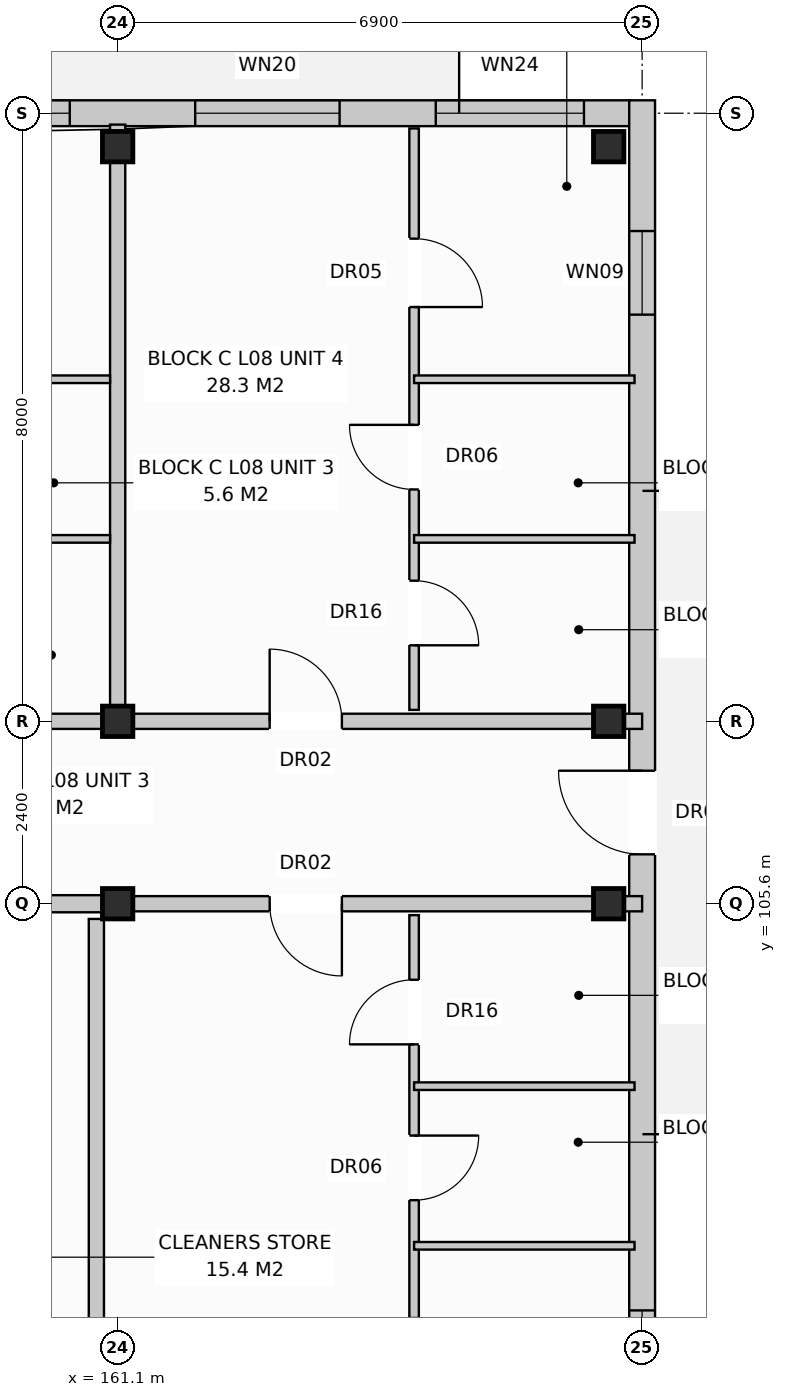
"""IFC4 building model, lengths in metres.
Left out: names, types, materials, properties, quantities, classifications, styles, units other than length and angle.
Written with IfcOpenShell. Run it as: python <this file> out.ifc"""

import sys

from ifc_helpers import new_model, si_unit, direction, frame, frame_2d, origin, origin_with_axes, origin_2d, place, context, subcontext, project, spatial, rectangle, extrude, element, fill, save


model = new_model("IFC4")
c1 = context("Model", 3, precision=1e-05, world=origin(), true_north=direction((0.0, 1.0)))
c2 = subcontext(c1, "Body", "Model", "MODEL_VIEW")
j1 = project(units=[si_unit("LENGTHUNIT", "METRE"), si_unit("PLANEANGLEUNIT", "RADIAN")], contexts=[c1])
p1 = place(None, origin())
s1 = spatial("IfcSite", under=j1, at=p1, CompositionType="ELEMENT")
p2 = place(p1, origin())
s2 = spatial("IfcBuilding", under=s1, at=p2, CompositionType="ELEMENT")
p3 = place(p2, frame((0.0, 0.0, 27.2)))
s3 = spatial("IfcBuildingStorey", under=s2, at=p3, CompositionType="ELEMENT", Elevation=27.2)
for number, where, z_axis, x_axis in (
    (1, (161.1, 105.6, 0.0), (0.0, 0.0, 1.0), (1.0, 0.0, 0.0)),
    (2, (161.1, 108.0, 0.0), (0.0, 0.0, 1.0), (1.0, 0.0, 0.0)),
    (3, (161.1, 115.56, 0.0), (0.0, 0.0, 1.0), (1.0, 0.0, 0.0)),
    (4, (167.56, 105.6, 0.0), (0.0, 0.0, 1.0), (1.0, 0.0, 0.0)),
    (5, (167.56, 108.0, 0.0), (0.0, 0.0, 1.0), (1.0, 0.0, 0.0)),
    (6, (167.56, 115.56, 0.0), (0.0, 0.0, 1.0), (1.0, 0.0, 0.0)),
):
    element("IfcColumn", number, at=place(p3, frame(where, z_axis=z_axis, x_axis=x_axis)), inside=s3, PredefinedType="COLUMN", context=c2, shape_type="SweptSolid", body=[
        extrude(rectangle(XDim=0.4, YDim=0.4, at=origin_2d()), origin(), (0.0, 0.0, 1.0), 3.2),
    ])
p4 = place(p3, frame((126.76, 116.0, 0.0), z_axis=(0.0, 0.0, 1.0), x_axis=(1.0, 0.0, 0.0)))
e7 = element("IfcWall", 7, at=p4, inside=s3, PredefinedType="STANDARD", context=c2, shape_type="SweptSolid", body=[
    extrude(rectangle(XDim=41.08, YDim=0.34, at=frame_2d((20.54, 0.0))), origin(), (0.0, 0.0, 1.0), 2.96),
])
p5 = place(p4, frame((2.767, 0.0, 0.0)))
e8 = element("IfcOpeningElement", 8, at=p5, cuts=e7, PredefinedType="OPENING", context=c2, shape_type="SweptSolid", body=[
    extrude(rectangle(XDim=1.05, YDim=2.12, at=frame_2d((0.525, 1.06))), frame((0.0, 0.182, 0.0), z_axis=(0.0, -1.0, 0.0), x_axis=(1.0, 0.0, 0.0)), (0.0, 0.0, 1.0), 0.364),
])
p6 = place(p4, frame((17.567, 0.0, 0.0)))
e9 = element("IfcOpeningElement", 9, at=p6, cuts=e7, PredefinedType="OPENING", context=c2, shape_type="SweptSolid", body=[
    extrude(rectangle(XDim=1.05, YDim=2.12, at=frame_2d((0.525, 1.06))), frame((0.0, 0.182, 0.0), z_axis=(0.0, -1.0, 0.0), x_axis=(1.0, 0.0, 0.0)), (0.0, 0.0, 1.0), 0.364),
])
p7 = place(p4, frame((30.067, 0.0, 0.0)))
e10 = element("IfcOpeningElement", 10, at=p7, cuts=e7, PredefinedType="OPENING", context=c2, shape_type="SweptSolid", body=[
    extrude(rectangle(XDim=1.05, YDim=2.12, at=frame_2d((0.525, 1.06))), frame((0.0, 0.182, 0.0), z_axis=(0.0, -1.0, 0.0), x_axis=(1.0, 0.0, 0.0)), (0.0, 0.0, 1.0), 0.364),
])
p8 = place(p4, frame((0.642, 0.0, 0.8)))
e11 = element("IfcOpeningElement", 11, at=p8, cuts=e7, PredefinedType="OPENING", context=c2, shape_type="SweptSolid", body=[
    extrude(rectangle(XDim=1.9, YDim=1.85, at=frame_2d((0.95, 0.925))), frame((0.0, 0.182, 0.0), z_axis=(0.0, -1.0, 0.0), x_axis=(1.0, 0.0, 0.0)), (0.0, 0.0, 1.0), 0.364),
])
p9 = place(p4, frame((4.41, 0.0, 0.8)))
e12 = element("IfcOpeningElement", 12, at=p9, cuts=e7, PredefinedType="OPENING", context=c2, shape_type="SweptSolid", body=[
    extrude(rectangle(XDim=1.8, YDim=1.7, at=frame_2d((0.9, 0.85))), frame((0.0, 0.182, 0.0), z_axis=(0.0, -1.0, 0.0), x_axis=(1.0, 0.0, 0.0)), (0.0, 0.0, 1.0), 0.364),
])
p10 = place(p4, frame((10.46, 0.0, 0.72)))
e13 = element("IfcOpeningElement", 13, at=p10, cuts=e7, PredefinedType="OPENING", context=c2, shape_type="SweptSolid", body=[
    extrude(rectangle(XDim=1.1, YDim=1.5, at=frame_2d((0.55, 0.75))), frame((0.0, 0.182, 0.0), z_axis=(0.0, -1.0, 0.0), x_axis=(1.0, 0.0, 0.0)), (0.0, 0.0, 1.0), 0.364),
])
p11 = place(p4, frame((15.76, 0.0, 0.72)))
e14 = element("IfcOpeningElement", 14, at=p11, cuts=e7, PredefinedType="OPENING", context=c2, shape_type="SweptSolid", body=[
    extrude(rectangle(XDim=1.1, YDim=1.5, at=frame_2d((0.55, 0.75))), frame((0.0, 0.182, 0.0), z_axis=(0.0, -1.0, 0.0), x_axis=(1.0, 0.0, 0.0)), (0.0, 0.0, 1.0), 0.364),
])
p12 = place(p4, frame((21.11, 0.0, 0.8)))
e15 = element("IfcOpeningElement", 15, at=p12, cuts=e7, PredefinedType="OPENING", context=c2, shape_type="SweptSolid", body=[
    extrude(rectangle(XDim=1.8, YDim=1.7, at=frame_2d((0.9, 0.85))), frame((0.0, 0.182, 0.0), z_axis=(0.0, -1.0, 0.0), x_axis=(1.0, 0.0, 0.0)), (0.0, 0.0, 1.0), 0.364),
])
p13 = place(p4, frame((24.66, 0.0, 0.72)))
e16 = element("IfcOpeningElement", 16, at=p13, cuts=e7, PredefinedType="OPENING", context=c2, shape_type="SweptSolid", body=[
    extrude(rectangle(XDim=1.1, YDim=1.5, at=frame_2d((0.55, 0.75))), frame((0.0, 0.182, 0.0), z_axis=(0.0, -1.0, 0.0), x_axis=(1.0, 0.0, 0.0)), (0.0, 0.0, 1.0), 0.364),
])
p14 = place(p4, frame((27.892, 0.0, 0.8)))
e17 = element("IfcOpeningElement", 17, at=p14, cuts=e7, PredefinedType="OPENING", context=c2, shape_type="SweptSolid", body=[
    extrude(rectangle(XDim=1.95, YDim=1.65, at=frame_2d((0.975, 0.825))), frame((0.0, 0.182, 0.0), z_axis=(0.0, -1.0, 0.0), x_axis=(1.0, 0.0, 0.0)), (0.0, 0.0, 1.0), 0.364),
])
p15 = place(p4, frame((31.91, 0.0, 0.8)))
e18 = element("IfcOpeningElement", 18, at=p15, cuts=e7, PredefinedType="OPENING", context=c2, shape_type="SweptSolid", body=[
    extrude(rectangle(XDim=1.8, YDim=1.7, at=frame_2d((0.9, 0.85))), frame((0.0, 0.182, 0.0), z_axis=(0.0, -1.0, 0.0), x_axis=(1.0, 0.0, 0.0)), (0.0, 0.0, 1.0), 0.364),
])
p16 = place(p4, frame((35.36, 0.0, 0.72)))
e19 = element("IfcOpeningElement", 19, at=p16, cuts=e7, PredefinedType="OPENING", context=c2, shape_type="SweptSolid", body=[
    extrude(rectangle(XDim=1.9, YDim=1.85, at=frame_2d((0.95, 0.925))), frame((0.0, 0.182, 0.0), z_axis=(0.0, -1.0, 0.0), x_axis=(1.0, 0.0, 0.0)), (0.0, 0.0, 1.0), 0.364),
])
p17 = place(p4, frame((38.525, 0.0, 0.8)))
e20 = element("IfcOpeningElement", 20, at=p17, cuts=e7, PredefinedType="OPENING", context=c2, shape_type="SweptSolid", body=[
    extrude(rectangle(XDim=1.95, YDim=1.65, at=frame_2d((0.975, 0.825))), frame((0.0, 0.182, 0.0), z_axis=(0.0, -1.0, 0.0), x_axis=(1.0, 0.0, 0.0)), (0.0, 0.0, 1.0), 0.364),
])
p18 = place(p3, frame((168.0, 97.43, 0.0), z_axis=(0.0, 0.0, 1.0), x_axis=(0.0, 1.0, 0.0)))
e21 = element("IfcWall", 21, at=p18, inside=s3, PredefinedType="STANDARD", context=c2, shape_type="SweptSolid", body=[
    extrude(rectangle(XDim=18.74, YDim=0.34, at=frame_2d((9.37, 0.0))), origin(), (0.0, 0.0, 1.0), 2.96),
])
p19 = place(p18, frame((8.82, 0.0, 0.0)))
e22 = element("IfcOpeningElement", 22, at=p19, cuts=e21, PredefinedType="OPENING", context=c2, shape_type="SweptSolid", body=[
    extrude(rectangle(XDim=1.1, YDim=2.1, at=frame_2d((0.55, 1.05))), frame((0.0, 0.182, 0.0), z_axis=(0.0, -1.0, 0.0), x_axis=(1.0, 0.0, 0.0)), (0.0, 0.0, 1.0), 0.364),
])
p20 = place(p18, frame((1.72, 0.0, 0.72)))
e23 = element("IfcOpeningElement", 23, at=p20, cuts=e21, PredefinedType="OPENING", context=c2, shape_type="SweptSolid", body=[
    extrude(rectangle(XDim=1.1, YDim=1.5, at=frame_2d((0.55, 0.75))), frame((0.0, 0.182, 0.0), z_axis=(0.0, -1.0, 0.0), x_axis=(1.0, 0.0, 0.0)), (0.0, 0.0, 1.0), 0.364),
])
p21 = place(p18, frame((15.92, 0.0, 0.72)))
e24 = element("IfcOpeningElement", 24, at=p21, cuts=e21, PredefinedType="OPENING", context=c2, shape_type="SweptSolid", body=[
    extrude(rectangle(XDim=1.1, YDim=1.5, at=frame_2d((0.55, 0.75))), frame((0.0, 0.182, 0.0), z_axis=(0.0, -1.0, 0.0), x_axis=(1.0, 0.0, 0.0)), (0.0, 0.0, 1.0), 0.364),
])
p22 = place(p3, frame((160.82, 97.8, 0.0), z_axis=(0.0, 0.0, 1.0), x_axis=(0.0, 1.0, 0.0)))
e25 = element("IfcWall", 25, at=p22, inside=s3, PredefinedType="PARTITIONING", context=c2, shape_type="SweptSolid", body=[
    extrude(rectangle(XDim=7.6, YDim=0.2, at=frame_2d((3.8, 0.0))), origin(), (0.0, 0.0, 1.0), 2.4),
])
p23 = place(p3, frame((151.2, 105.6, 0.0), z_axis=(0.0, 0.0, 1.0), x_axis=(1.0, 0.0, 0.0)))
e26 = element("IfcWall", 26, at=p23, inside=s3, PredefinedType="PARTITIONING", context=c2, shape_type="SweptSolid", body=[
    extrude(rectangle(XDim=9.9, YDim=0.225, at=frame_2d((4.95, 0.0))), origin(), (0.0, 0.0, 1.0), 2.4),
])
p24 = place(p23, frame((0.475, 0.0, 0.0)))
e27 = element("IfcOpeningElement", 27, at=p24, cuts=e26, PredefinedType="OPENING", context=c2, shape_type="SweptSolid", body=[
    extrude(rectangle(XDim=1.1, YDim=2.15, at=frame_2d((0.55, 1.075))), frame((0.0, 0.125, 0.0), z_axis=(0.0, -1.0, 0.0), x_axis=(1.0, 0.0, 0.0)), (0.0, 0.0, 1.0), 0.249),
])
p25 = place(p23, frame((5.75, 0.0, 0.0)))
e28 = element("IfcOpeningElement", 28, at=p25, cuts=e26, PredefinedType="OPENING", context=c2, shape_type="SweptSolid", body=[
    extrude(rectangle(XDim=0.9, YDim=2.1, at=frame_2d((0.45, 1.05))), frame((0.0, 0.125, 0.0), z_axis=(0.0, -1.0, 0.0), x_axis=(1.0, 0.0, 0.0)), (0.0, 0.0, 1.0), 0.249),
])
p26 = place(p23, frame((7.8, 0.0, 0.0)))
e29 = element("IfcOpeningElement", 29, at=p26, cuts=e26, PredefinedType="OPENING", context=c2, shape_type="SweptSolid", body=[
    extrude(rectangle(XDim=0.95, YDim=2.15, at=frame_2d((0.475, 1.075))), frame((0.0, 0.125, 0.0), z_axis=(0.0, -1.0, 0.0), x_axis=(1.0, 0.0, 0.0)), (0.0, 0.0, 1.0), 0.249),
])
p27 = place(p3, frame((161.1, 108.15, 0.0), z_axis=(0.0, 0.0, 1.0), x_axis=(0.0, 1.0, 0.0)))
e30 = element("IfcWall", 30, at=p27, inside=s3, PredefinedType="PARTITIONING", context=c2, shape_type="SweptSolid", body=[
    extrude(rectangle(XDim=7.7, YDim=0.2, at=frame_2d((3.85, 0.0))), origin(), (0.0, 0.0, 1.0), 2.4),
])
p28 = place(p3, frame((154.2, 108.0, 0.0), z_axis=(0.0, 0.0, 1.0), x_axis=(1.0, 0.0, 0.0)))
e31 = element("IfcWall", 31, at=p28, inside=s3, PredefinedType="PARTITIONING", context=c2, shape_type="SweptSolid", body=[
    extrude(rectangle(XDim=6.9, YDim=0.2, at=frame_2d((3.45, 0.0))), origin(), (0.0, 0.0, 1.0), 2.4),
])
p29 = place(p28, frame((2.0, 0.0, 0.0)))
e32 = element("IfcOpeningElement", 32, at=p29, cuts=e31, PredefinedType="OPENING", context=c2, shape_type="SweptSolid", body=[
    extrude(rectangle(XDim=0.95, YDim=2.15, at=frame_2d((0.475, 1.075))), frame((0.0, 0.112, 0.0), z_axis=(0.0, -1.0, 0.0), x_axis=(1.0, 0.0, 0.0)), (0.0, 0.0, 1.0), 0.224),
])
for number, where, z_axis, x_axis in (
    (33, (158.1, 110.4, 0.0), (0.0, 0.0, 1.0), (1.0, 0.0, 0.0)),
    (34, (158.1, 112.5, 0.0), (0.0, 0.0, 1.0), (1.0, 0.0, 0.0)),
):
    element("IfcWall", number, at=place(p3, frame(where, z_axis=z_axis, x_axis=x_axis)), inside=s3, PredefinedType="PARTITIONING", context=c2, shape_type="SweptSolid", body=[
        extrude(rectangle(XDim=2.9, YDim=0.1, at=frame_2d((1.45, 0.0))), origin(), (0.0, 0.0, 1.0), 2.96),
    ])
p30 = place(p3, frame((161.1, 108.0, 0.0), z_axis=(0.0, 0.0, 1.0), x_axis=(1.0, 0.0, 0.0)))
e35 = element("IfcWall", 35, at=p30, inside=s3, PredefinedType="PARTITIONING", context=c2, shape_type="SweptSolid", body=[
    extrude(rectangle(XDim=6.9, YDim=0.2, at=frame_2d((3.45, 0.0))), origin(), (0.0, 0.0, 1.0), 2.4),
])
p31 = place(p30, frame((2.0, 0.0, 0.0)))
e36 = element("IfcOpeningElement", 36, at=p31, cuts=e35, PredefinedType="OPENING", context=c2, shape_type="SweptSolid", body=[
    extrude(rectangle(XDim=0.95, YDim=2.15, at=frame_2d((0.475, 1.075))), frame((0.0, 0.112, 0.0), z_axis=(0.0, -1.0, 0.0), x_axis=(1.0, 0.0, 0.0)), (0.0, 0.0, 1.0), 0.224),
])
p32 = place(p3, frame((165.0, 108.15, 0.0), z_axis=(0.0, 0.0, 1.0), x_axis=(0.0, 1.0, 0.0)))
e37 = element("IfcWall", 37, at=p32, inside=s3, PredefinedType="PARTITIONING", context=c2, shape_type="SweptSolid", body=[
    extrude(rectangle(XDim=7.65, YDim=0.125, at=frame_2d((3.825, 0.0))), origin(), (0.0, 0.0, 1.0), 2.59),
])
p33 = place(p32, frame((0.85, 0.0, 0.0)))
e38 = element("IfcOpeningElement", 38, at=p33, cuts=e37, PredefinedType="OPENING", context=c2, shape_type="SweptSolid", body=[
    extrude(rectangle(XDim=0.85, YDim=2.1, at=frame_2d((0.425, 1.05))), frame((0.0, 0.074, 0.0), z_axis=(0.0, -1.0, 0.0), x_axis=(1.0, 0.0, 0.0)), (0.0, 0.0, 1.0), 0.149),
])
p34 = place(p32, frame((2.9, 0.0, 0.0)))
e39 = element("IfcOpeningElement", 39, at=p34, cuts=e37, PredefinedType="OPENING", context=c2, shape_type="SweptSolid", body=[
    extrude(rectangle(XDim=0.85, YDim=2.05, at=frame_2d((0.425, 1.025))), frame((0.0, 0.074, 0.0), z_axis=(0.0, -1.0, 0.0), x_axis=(1.0, 0.0, 0.0)), (0.0, 0.0, 1.0), 0.149),
])
p35 = place(p32, frame((5.3, 0.0, 0.0)))
e40 = element("IfcOpeningElement", 40, at=p35, cuts=e37, PredefinedType="OPENING", context=c2, shape_type="SweptSolid", body=[
    extrude(rectangle(XDim=0.9, YDim=2.1, at=frame_2d((0.45, 1.05))), frame((0.0, 0.074, 0.0), z_axis=(0.0, -1.0, 0.0), x_axis=(1.0, 0.0, 0.0)), (0.0, 0.0, 1.0), 0.149),
])
for number, where, z_axis, x_axis in (
    (41, (165.0, 110.4, 0.0), (0.0, 0.0, 1.0), (1.0, 0.0, 0.0)),
    (42, (165.0, 112.5, 0.0), (0.0, 0.0, 1.0), (1.0, 0.0, 0.0)),
):
    element("IfcWall", number, at=place(p3, frame(where, z_axis=z_axis, x_axis=x_axis)), inside=s3, PredefinedType="PARTITIONING", context=c2, shape_type="SweptSolid", body=[
        extrude(rectangle(XDim=2.9, YDim=0.1, at=frame_2d((1.45, 0.0))), origin(), (0.0, 0.0, 1.0), 2.96),
    ])
p36 = place(p3, frame((161.1, 105.6, 0.0), z_axis=(0.0, 0.0, 1.0), x_axis=(1.0, 0.0, 0.0)))
e43 = element("IfcWall", 43, at=p36, inside=s3, PredefinedType="PARTITIONING", context=c2, shape_type="SweptSolid", body=[
    extrude(rectangle(XDim=6.9, YDim=0.2, at=frame_2d((3.45, 0.0))), origin(), (0.0, 0.0, 1.0), 2.4),
])
p37 = place(p36, frame((2.0, 0.0, 0.0)))
e44 = element("IfcOpeningElement", 44, at=p37, cuts=e43, PredefinedType="OPENING", context=c2, shape_type="SweptSolid", body=[
    extrude(rectangle(XDim=0.95, YDim=2.15, at=frame_2d((0.475, 1.075))), frame((0.0, 0.112, 0.0), z_axis=(0.0, -1.0, 0.0), x_axis=(1.0, 0.0, 0.0)), (0.0, 0.0, 1.0), 0.224),
])
p38 = place(p3, frame((165.0, 105.45, 0.0), z_axis=(0.0, 0.0, 1.0), x_axis=(0.0, -1.0, 0.0)))
e45 = element("IfcWall", 45, at=p38, inside=s3, PredefinedType="PARTITIONING", context=c2, shape_type="SweptSolid", body=[
    extrude(rectangle(XDim=7.65, YDim=0.125, at=frame_2d((3.825, 0.0))), origin(), (0.0, 0.0, 1.0), 2.59),
])
p39 = place(p38, frame((0.85, 0.0, 0.0)))
e46 = element("IfcOpeningElement", 46, at=p39, cuts=e45, PredefinedType="OPENING", context=c2, shape_type="SweptSolid", body=[
    extrude(rectangle(XDim=0.85, YDim=2.1, at=frame_2d((0.425, 1.05))), frame((0.0, 0.074, 0.0), z_axis=(0.0, -1.0, 0.0), x_axis=(1.0, 0.0, 0.0)), (0.0, 0.0, 1.0), 0.149),
])
p40 = place(p38, frame((2.9, 0.0, 0.0)))
e47 = element("IfcOpeningElement", 47, at=p40, cuts=e45, PredefinedType="OPENING", context=c2, shape_type="SweptSolid", body=[
    extrude(rectangle(XDim=0.85, YDim=2.05, at=frame_2d((0.425, 1.025))), frame((0.0, 0.074, 0.0), z_axis=(0.0, -1.0, 0.0), x_axis=(1.0, 0.0, 0.0)), (0.0, 0.0, 1.0), 0.149),
])
p41 = place(p38, frame((5.3, 0.0, 0.0)))
e48 = element("IfcOpeningElement", 48, at=p41, cuts=e45, PredefinedType="OPENING", context=c2, shape_type="SweptSolid", body=[
    extrude(rectangle(XDim=0.9, YDim=2.1, at=frame_2d((0.45, 1.05))), frame((0.0, 0.074, 0.0), z_axis=(0.0, -1.0, 0.0), x_axis=(1.0, 0.0, 0.0)), (0.0, 0.0, 1.0), 0.149),
])
for number, where, z_axis, x_axis in (
    (49, (165.0, 103.2, 0.0), (0.0, 0.0, 1.0), (1.0, 0.0, 0.0)),
    (50, (165.0, 101.1, 0.0), (0.0, 0.0, 1.0), (1.0, 0.0, 0.0)),
):
    element("IfcWall", number, at=place(p3, frame(where, z_axis=z_axis, x_axis=x_axis)), inside=s3, PredefinedType="PARTITIONING", context=c2, shape_type="SweptSolid", body=[
        extrude(rectangle(XDim=2.9, YDim=0.1, at=frame_2d((1.45, 0.0))), origin(), (0.0, 0.0, 1.0), 2.96),
    ])
p42 = place(p15, origin_with_axes())
e51 = element("IfcWindow", 51, at=p42, inside=s3, PartitioningType="SINGLE_PANEL", PredefinedType="WINDOW", context=c2, shape_type="SweptSolid", body=[
    extrude(rectangle(XDim=1.8, YDim=1.7, at=frame_2d((0.9, 0.85))), frame((0.0, 0.03, 0.0), z_axis=(0.0, -1.0, 0.0), x_axis=(1.0, 0.0, 0.0)), (0.0, 0.0, 1.0), 0.06),
])
fill(e18, e51)
p43 = place(p16, origin_with_axes())
e52 = element("IfcWindow", 52, at=p43, inside=s3, PartitioningType="SINGLE_PANEL", PredefinedType="WINDOW", context=c2, shape_type="SweptSolid", body=[
    extrude(rectangle(XDim=1.9, YDim=1.85, at=frame_2d((0.95, 0.925))), frame((0.0, 0.03, 0.0), z_axis=(0.0, -1.0, 0.0), x_axis=(1.0, 0.0, 0.0)), (0.0, 0.0, 1.0), 0.06),
])
fill(e19, e52)
p44 = place(p17, origin_with_axes())
e53 = element("IfcWindow", 53, at=p44, inside=s3, PartitioningType="SINGLE_PANEL", PredefinedType="WINDOW", context=c2, shape_type="SweptSolid", body=[
    extrude(rectangle(XDim=1.95, YDim=1.65, at=frame_2d((0.975, 0.825))), frame((0.0, 0.03, 0.0), z_axis=(0.0, -1.0, 0.0), x_axis=(1.0, 0.0, 0.0)), (0.0, 0.0, 1.0), 0.06),
])
fill(e20, e53)
p45 = place(p19, origin_with_axes())
e54 = element("IfcDoor", 54, at=p45, inside=s3, OperationType="SINGLE_SWING_RIGHT", PredefinedType="DOOR", context=c2, shape_type="SweptSolid", body=[
    extrude(rectangle(XDim=1.1, YDim=2.1, at=frame_2d((0.55, 1.05))), frame((0.0, 0.025, 0.0), z_axis=(0.0, -1.0, 0.0), x_axis=(1.0, 0.0, 0.0)), (0.0, 0.0, 1.0), 0.05),
])
fill(e22, e54)
p46 = place(p20, origin_with_axes())
e55 = element("IfcWindow", 55, at=p46, inside=s3, PartitioningType="SINGLE_PANEL", PredefinedType="WINDOW", context=c2, shape_type="SweptSolid", body=[
    extrude(rectangle(XDim=1.1, YDim=1.5, at=frame_2d((0.55, 0.75))), frame((0.0, 0.03, 0.0), z_axis=(0.0, -1.0, 0.0), x_axis=(1.0, 0.0, 0.0)), (0.0, 0.0, 1.0), 0.06),
])
fill(e23, e55)
p47 = place(p21, origin_with_axes())
e56 = element("IfcWindow", 56, at=p47, inside=s3, PartitioningType="SINGLE_PANEL", PredefinedType="WINDOW", context=c2, shape_type="SweptSolid", body=[
    extrude(rectangle(XDim=1.1, YDim=1.5, at=frame_2d((0.55, 0.75))), frame((0.0, 0.03, 0.0), z_axis=(0.0, -1.0, 0.0), x_axis=(1.0, 0.0, 0.0)), (0.0, 0.0, 1.0), 0.06),
])
fill(e24, e56)
p48 = place(p31, origin_with_axes())
e57 = element("IfcDoor", 57, at=p48, inside=s3, OperationType="SINGLE_SWING_LEFT", PredefinedType="DOOR", context=c2, shape_type="SweptSolid", body=[
    extrude(rectangle(XDim=0.95, YDim=2.15, at=frame_2d((0.475, 1.075))), frame((0.0, 0.025, 0.0), z_axis=(0.0, -1.0, 0.0), x_axis=(1.0, 0.0, 0.0)), (0.0, 0.0, 1.0), 0.05),
])
fill(e36, e57)
p49 = place(p33, frame((0.85, 0.0, 0.0), z_axis=(0.0, 0.0, 1.0), x_axis=(-1.0, 0.0, 0.0)))
e58 = element("IfcDoor", 58, at=p49, inside=s3, OperationType="SINGLE_SWING_LEFT", PredefinedType="DOOR", context=c2, shape_type="SweptSolid", body=[
    extrude(rectangle(XDim=0.85, YDim=2.1, at=frame_2d((0.425, 1.05))), frame((0.0, 0.025, 0.0), z_axis=(0.0, -1.0, 0.0), x_axis=(1.0, 0.0, 0.0)), (0.0, 0.0, 1.0), 0.05),
])
fill(e38, e58)
p50 = place(p34, origin_with_axes())
e59 = element("IfcDoor", 59, at=p50, inside=s3, OperationType="SINGLE_SWING_RIGHT", PredefinedType="DOOR", context=c2, shape_type="SweptSolid", body=[
    extrude(rectangle(XDim=0.85, YDim=2.05, at=frame_2d((0.425, 1.025))), frame((0.0, 0.025, 0.0), z_axis=(0.0, -1.0, 0.0), x_axis=(1.0, 0.0, 0.0)), (0.0, 0.0, 1.0), 0.05),
])
fill(e39, e59)
p51 = place(p35, frame((0.9, 0.0, 0.0), z_axis=(0.0, 0.0, 1.0), x_axis=(-1.0, 0.0, 0.0)))
e60 = element("IfcDoor", 60, at=p51, inside=s3, OperationType="SINGLE_SWING_LEFT", PredefinedType="DOOR", context=c2, shape_type="SweptSolid", body=[
    extrude(rectangle(XDim=0.9, YDim=2.1, at=frame_2d((0.45, 1.05))), frame((0.0, 0.025, 0.0), z_axis=(0.0, -1.0, 0.0), x_axis=(1.0, 0.0, 0.0)), (0.0, 0.0, 1.0), 0.05),
])
fill(e40, e60)
p52 = place(p37, frame((0.95, 0.0, 0.0), z_axis=(0.0, 0.0, 1.0), x_axis=(-1.0, 0.0, 0.0)))
e61 = element("IfcDoor", 61, at=p52, inside=s3, OperationType="SINGLE_SWING_RIGHT", PredefinedType="DOOR", context=c2, shape_type="SweptSolid", body=[
    extrude(rectangle(XDim=0.95, YDim=2.15, at=frame_2d((0.475, 1.075))), frame((0.0, 0.025, 0.0), z_axis=(0.0, -1.0, 0.0), x_axis=(1.0, 0.0, 0.0)), (0.0, 0.0, 1.0), 0.05),
])
fill(e44, e61)
p53 = place(p39, frame((0.85, 0.0, 0.0), z_axis=(0.0, 0.0, 1.0), x_axis=(-1.0, 0.0, 0.0)))
e62 = element("IfcDoor", 62, at=p53, inside=s3, OperationType="SINGLE_SWING_RIGHT", PredefinedType="DOOR", context=c2, shape_type="SweptSolid", body=[
    extrude(rectangle(XDim=0.85, YDim=2.1, at=frame_2d((0.425, 1.05))), frame((0.0, 0.025, 0.0), z_axis=(0.0, -1.0, 0.0), x_axis=(1.0, 0.0, 0.0)), (0.0, 0.0, 1.0), 0.05),
])
fill(e46, e62)
p54 = place(p40, origin_with_axes())
e63 = element("IfcDoor", 63, at=p54, inside=s3, OperationType="SINGLE_SWING_LEFT", PredefinedType="DOOR", context=c2, shape_type="SweptSolid", body=[
    extrude(rectangle(XDim=0.85, YDim=2.05, at=frame_2d((0.425, 1.025))), frame((0.0, 0.025, 0.0), z_axis=(0.0, -1.0, 0.0), x_axis=(1.0, 0.0, 0.0)), (0.0, 0.0, 1.0), 0.05),
])
fill(e47, e63)
save(model, sys.argv[1])
